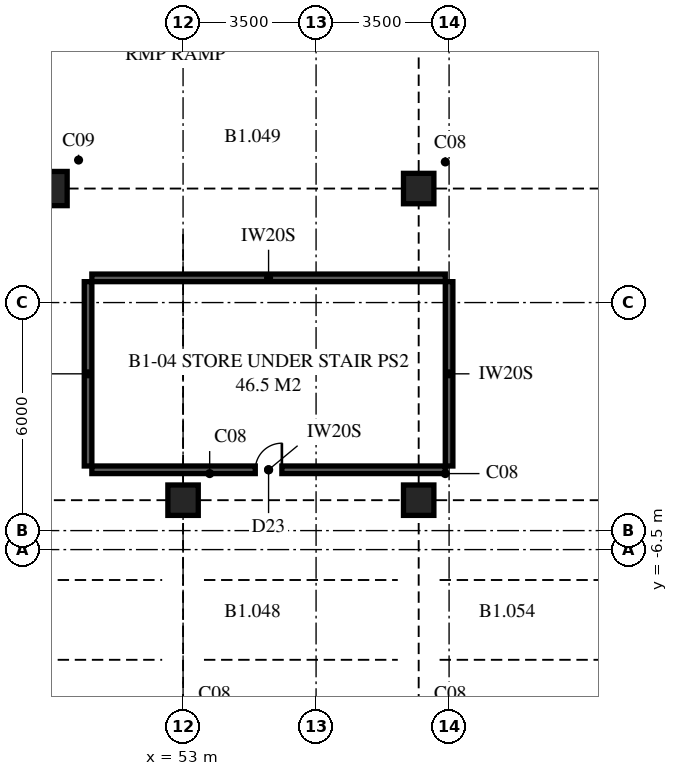
"""IFC4 building model, lengths in metres.
Left out: names, types, materials, properties, quantities, classifications, styles, units other than length and angle.
Written with IfcOpenShell. Run it as: python <this file> out.ifc"""

import sys

from ifc_helpers import new_model, si_unit, direction, frame, frame_2d, origin, origin_2d, place, context, subcontext, project, spatial, rectangle, extrude, element, fill, save


model = new_model("IFC4")
c1 = context("Model", 3, precision=1e-05, world=origin(), true_north=direction((0.0, 1.0)))
c2 = subcontext(c1, "Body", "Model", "MODEL_VIEW")
j1 = project(units=[si_unit("LENGTHUNIT", "METRE"), si_unit("PLANEANGLEUNIT", "RADIAN")], contexts=[c1])
p1 = place(None, origin())
s1 = spatial("IfcSite", under=j1, at=p1, CompositionType="ELEMENT")
p2 = place(p1, origin())
s2 = spatial("IfcBuilding", under=s1, at=p2, CompositionType="ELEMENT")
p3 = place(p2, frame((0.0, 0.0, -4.0)))
s3 = spatial("IfcBuildingStorey", under=s2, at=p3, CompositionType="ELEMENT", Elevation=-4.0)
for number, where, z_axis, x_axis in (
    (1, (53.0, -5.2, 0.0), (0.0, 0.0, 1.0), (1.0, 0.0, 0.0)),
    (2, (59.2, -5.2, 0.0), (0.0, 0.0, 1.0), (1.0, 0.0, 0.0)),
):
    element("IfcColumn", number, at=place(p3, frame(where, z_axis=z_axis, x_axis=x_axis)), inside=s3, PredefinedType="COLUMN", context=c2, shape_type="SweptSolid", body=[
        extrude(rectangle(XDim=0.8, YDim=0.8, at=origin_2d()), origin(), (0.0, 0.0, 1.0), 4.0),
    ])
p4 = place(p3, frame((49.5, 3.0, 0.0), z_axis=(0.0, 0.0, 1.0), x_axis=(1.0, 0.0, 0.0)))
e3 = element("IfcColumn", 3, at=p4, inside=s3, PredefinedType="COLUMN", context=c2, shape_type="SweptSolid", body=[
    extrude(rectangle(XDim=0.9, YDim=0.9, at=origin_2d()), origin(), (0.0, 0.0, 1.0), 4.0),
])
p5 = place(p3, frame((59.2, 3.0, 0.0), z_axis=(0.0, 0.0, 1.0), x_axis=(1.0, 0.0, 0.0)))
e4 = element("IfcColumn", 4, at=p5, inside=s3, PredefinedType="COLUMN", context=c2, shape_type="SweptSolid", body=[
    extrude(rectangle(XDim=0.8, YDim=0.8, at=origin_2d()), origin(), (0.0, 0.0, 1.0), 4.0),
])
for number, where, z_axis, x_axis in (
    (5, (50.5, -4.3, 0.0), (0.0, 0.0, 1.0), (0.0, 1.0, 0.0)),
    (6, (60.0, -4.3, 0.0), (0.0, 0.0, 1.0), (0.0, 1.0, 0.0)),
):
    element("IfcWall", number, at=place(p3, frame(where, z_axis=z_axis, x_axis=x_axis)), inside=s3, PredefinedType="SOLIDWALL", context=c2, shape_type="SweptSolid", body=[
        extrude(rectangle(XDim=4.85, YDim=0.2, at=frame_2d((2.425, 0.0))), origin(), (0.0, 0.0, 1.0), 4.0),
    ])
p6 = place(p3, frame((50.6, -4.4, 0.0), z_axis=(0.0, 0.0, 1.0), x_axis=(1.0, 0.0, 0.0)))
e7 = element("IfcWall", 7, at=p6, inside=s3, PredefinedType="SOLIDWALL", context=c2, shape_type="SweptSolid", body=[
    extrude(rectangle(XDim=9.3, YDim=0.2, at=frame_2d((4.65, 0.0))), origin(), (0.0, 0.0, 1.0), 4.0),
])
p7 = place(p6, frame((4.3, 0.0, 0.0)))
e8 = element("IfcOpeningElement", 8, at=p7, cuts=e7, PredefinedType="OPENING", context=c2, shape_type="SweptSolid", body=[
    extrude(rectangle(XDim=0.7, YDim=2.1, at=frame_2d((0.35, 1.05))), frame((0.0, 0.11, 0.0), z_axis=(0.0, -1.0, 0.0), x_axis=(1.0, 0.0, 0.0)), (0.0, 0.0, 1.0), 0.22),
])
p8 = place(p3, frame((50.6, 0.65, 0.0), z_axis=(0.0, 0.0, 1.0), x_axis=(1.0, 0.0, 0.0)))
e9 = element("IfcWall", 9, at=p8, inside=s3, PredefinedType="SOLIDWALL", context=c2, shape_type="SweptSolid", body=[
    extrude(rectangle(XDim=9.3, YDim=0.2, at=frame_2d((4.65, 0.0))), origin(), (0.0, 0.0, 1.0), 4.0),
])
p9 = place(p7, origin())
e10 = element("IfcDoor", 10, at=p9, inside=s3, OperationType="SINGLE_SWING_RIGHT", PredefinedType="DOOR", context=c2, shape_type="SweptSolid", body=[
    extrude(rectangle(XDim=0.7, YDim=2.1, at=frame_2d((0.35, 1.05))), frame((0.0, 0.025, 0.0), z_axis=(0.0, -1.0, 0.0), x_axis=(1.0, 0.0, 0.0)), (0.0, 0.0, 1.0), 0.05),
])
fill(e8, e10)
save(model, sys.argv[1])
